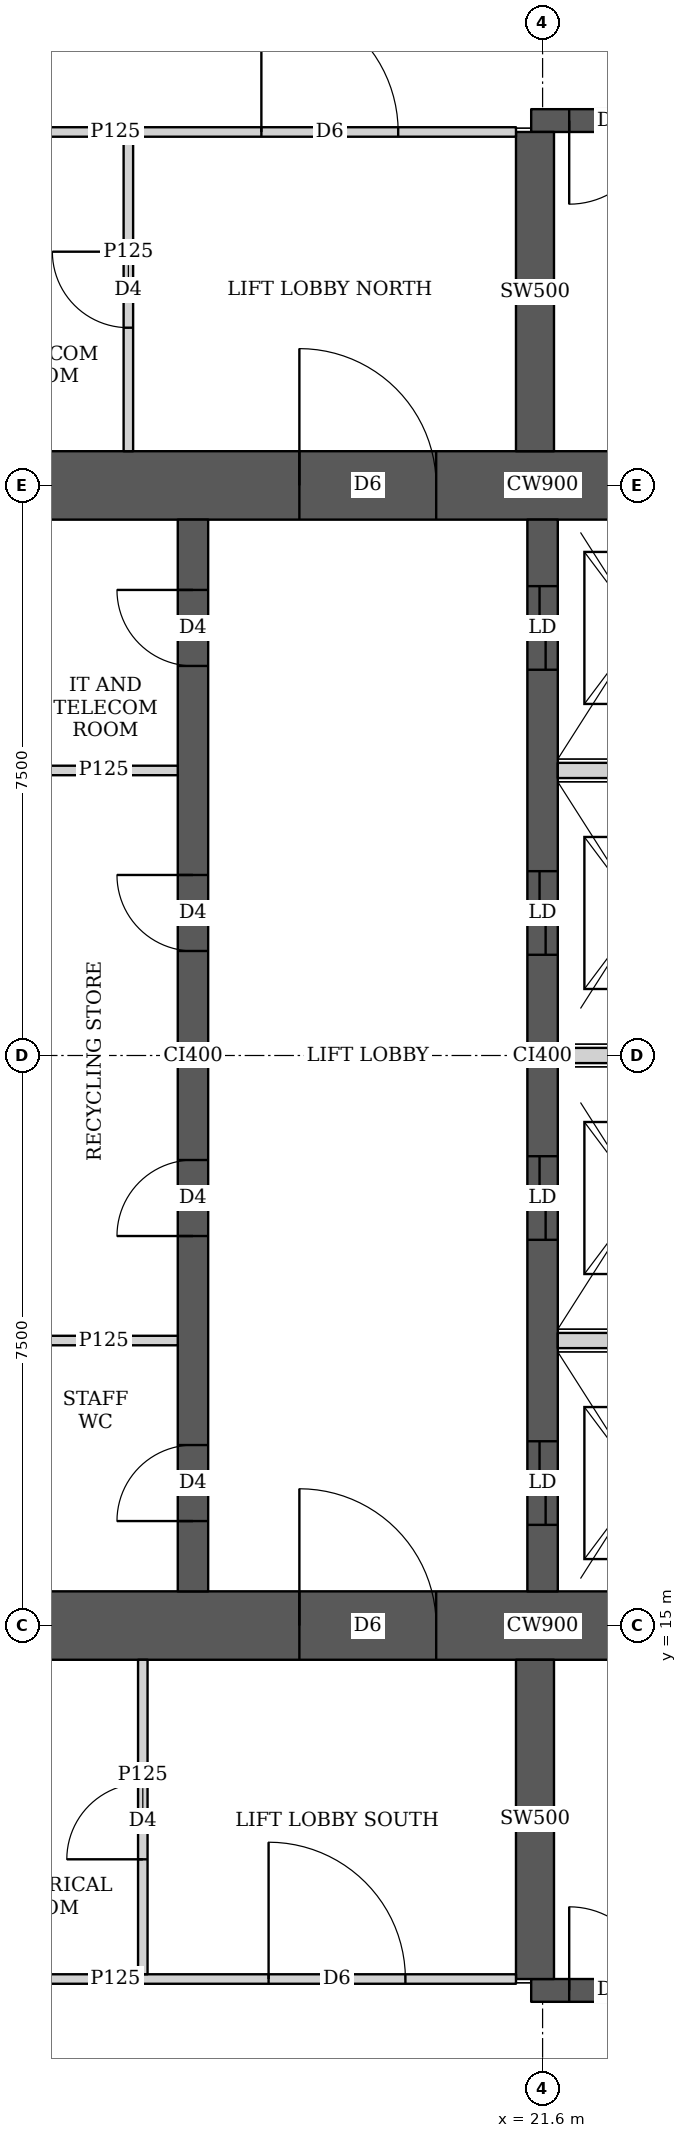
"""IFC4 building model, lengths in metres.
Left out: names, types, materials, properties, quantities, classifications, styles, units other than length and angle.
Written with IfcOpenShell. Run it as: python <this file> out.ifc"""

import sys

from ifc_helpers import new_model, si_unit, direction, frame, frame_2d, origin, place, context, subcontext, project, spatial, rectangle, extrude, element, fill, save


model = new_model("IFC4")
c1 = context("Model", 3, precision=1e-05, world=origin(), true_north=direction((0.0, 1.0)))
c2 = subcontext(c1, "Body", "Model", "MODEL_VIEW")
j1 = project(units=[si_unit("LENGTHUNIT", "METRE"), si_unit("PLANEANGLEUNIT", "RADIAN")], contexts=[c1])
p1 = place(None, origin())
s1 = spatial("IfcSite", under=j1, at=p1, CompositionType="ELEMENT")
p2 = place(p1, origin())
s2 = spatial("IfcBuilding", under=s1, at=p2, CompositionType="ELEMENT")
p3 = place(p2, frame((0.0, 0.0, 204.95)))
s3 = spatial("IfcBuildingStorey", under=s2, at=p3, CompositionType="ELEMENT", Elevation=204.95)
p4 = place(p3, frame((13.95, 15.0, 0.0), z_axis=(0.0, 0.0, 1.0), x_axis=(1.0, 0.0, 0.0)))
e1 = element("IfcWall", 1, at=p4, inside=s3, PredefinedType="SHEAR", context=c2, shape_type="SweptSolid", body=[
    extrude(rectangle(XDim=15.3, YDim=0.9, at=frame_2d((7.65, 0.0))), origin(), (0.0, 0.0, 1.0), 3.75),
])
p5 = place(p4, frame((4.45, 0.0, 0.0)))
e2 = element("IfcOpeningElement", 2, at=p5, cuts=e1, PredefinedType="OPENING", context=c2, shape_type="SweptSolid", body=[
    extrude(rectangle(XDim=1.8, YDim=2.1, at=frame_2d((0.9, 1.05))), frame((0.0, 0.46, 0.0), z_axis=(0.0, -1.0, 0.0), x_axis=(1.0, 0.0, 0.0)), (0.0, 0.0, 1.0), 0.92),
])
p6 = place(p4, frame((10.7, 0.0, 0.0)))
e3 = element("IfcOpeningElement", 3, at=p6, cuts=e1, PredefinedType="OPENING", context=c2, shape_type="SweptSolid", body=[
    extrude(rectangle(XDim=1.1, YDim=2.1, at=frame_2d((0.55, 1.05))), frame((0.0, 0.46, 0.0), z_axis=(0.0, -1.0, 0.0), x_axis=(1.0, 0.0, 0.0)), (0.0, 0.0, 1.0), 0.92),
])
p7 = place(p3, frame((13.95, 30.0, 0.0), z_axis=(0.0, 0.0, 1.0), x_axis=(1.0, 0.0, 0.0)))
e4 = element("IfcWall", 4, at=p7, inside=s3, PredefinedType="SHEAR", context=c2, shape_type="SweptSolid", body=[
    extrude(rectangle(XDim=15.3, YDim=0.9, at=frame_2d((7.65, 0.0))), origin(), (0.0, 0.0, 1.0), 3.75),
])
p8 = place(p7, frame((4.45, 0.0, 0.0)))
e5 = element("IfcOpeningElement", 5, at=p8, cuts=e4, PredefinedType="OPENING", context=c2, shape_type="SweptSolid", body=[
    extrude(rectangle(XDim=1.8, YDim=2.1, at=frame_2d((0.9, 1.05))), frame((0.0, 0.46, 0.0), z_axis=(0.0, -1.0, 0.0), x_axis=(1.0, 0.0, 0.0)), (0.0, 0.0, 1.0), 0.92),
])
p9 = place(p7, frame((10.7, 0.0, 0.0)))
e6 = element("IfcOpeningElement", 6, at=p9, cuts=e4, PredefinedType="OPENING", context=c2, shape_type="SweptSolid", body=[
    extrude(rectangle(XDim=1.1, YDim=2.1, at=frame_2d((0.55, 1.05))), frame((0.0, 0.46, 0.0), z_axis=(0.0, -1.0, 0.0), x_axis=(1.0, 0.0, 0.0)), (0.0, 0.0, 1.0), 0.92),
])
p10 = place(p3, frame((17.0, 15.45, 0.0), z_axis=(0.0, 0.0, 1.0), x_axis=(0.0, 1.0, 0.0)))
e7 = element("IfcWall", 7, at=p10, inside=s3, PredefinedType="SHEAR", context=c2, shape_type="SweptSolid", body=[
    extrude(rectangle(XDim=14.1, YDim=0.4, at=frame_2d((7.05, 0.0))), origin(), (0.0, 0.0, 1.0), 3.75),
])
p11 = place(p10, frame((0.925, 0.0, 0.0)))
e8 = element("IfcOpeningElement", 8, at=p11, cuts=e7, PredefinedType="OPENING", context=c2, shape_type="SweptSolid", body=[
    extrude(rectangle(XDim=1.0, YDim=2.1, at=frame_2d((0.5, 1.05))), frame((0.0, 0.21, 0.0), z_axis=(0.0, -1.0, 0.0), x_axis=(1.0, 0.0, 0.0)), (0.0, 0.0, 1.0), 0.42),
])
p12 = place(p10, frame((4.675, 0.0, 0.0)))
e9 = element("IfcOpeningElement", 9, at=p12, cuts=e7, PredefinedType="OPENING", context=c2, shape_type="SweptSolid", body=[
    extrude(rectangle(XDim=1.0, YDim=2.1, at=frame_2d((0.5, 1.05))), frame((0.0, 0.21, 0.0), z_axis=(0.0, -1.0, 0.0), x_axis=(1.0, 0.0, 0.0)), (0.0, 0.0, 1.0), 0.42),
])
p13 = place(p10, frame((8.425, 0.0, 0.0)))
e10 = element("IfcOpeningElement", 10, at=p13, cuts=e7, PredefinedType="OPENING", context=c2, shape_type="SweptSolid", body=[
    extrude(rectangle(XDim=1.0, YDim=2.1, at=frame_2d((0.5, 1.05))), frame((0.0, 0.21, 0.0), z_axis=(0.0, -1.0, 0.0), x_axis=(1.0, 0.0, 0.0)), (0.0, 0.0, 1.0), 0.42),
])
p14 = place(p10, frame((12.175, 0.0, 0.0)))
e11 = element("IfcOpeningElement", 11, at=p14, cuts=e7, PredefinedType="OPENING", context=c2, shape_type="SweptSolid", body=[
    extrude(rectangle(XDim=1.0, YDim=2.1, at=frame_2d((0.5, 1.05))), frame((0.0, 0.21, 0.0), z_axis=(0.0, -1.0, 0.0), x_axis=(1.0, 0.0, 0.0)), (0.0, 0.0, 1.0), 0.42),
])
p15 = place(p3, frame((21.6, 15.45, 0.0), z_axis=(0.0, 0.0, 1.0), x_axis=(0.0, 1.0, 0.0)))
e12 = element("IfcWall", 12, at=p15, inside=s3, PredefinedType="SHEAR", context=c2, shape_type="SweptSolid", body=[
    extrude(rectangle(XDim=14.1, YDim=0.4, at=frame_2d((7.05, 0.0))), origin(), (0.0, 0.0, 1.0), 3.75),
])
p16 = place(p15, frame((0.875, 0.0, 0.0)))
e13 = element("IfcOpeningElement", 13, at=p16, cuts=e12, PredefinedType="OPENING", context=c2, shape_type="SweptSolid", body=[
    extrude(rectangle(XDim=1.1, YDim=2.1, at=frame_2d((0.55, 1.05))), frame((0.0, 0.21, 0.0), z_axis=(0.0, -1.0, 0.0), x_axis=(1.0, 0.0, 0.0)), (0.0, 0.0, 1.0), 0.42),
])
p17 = place(p15, frame((4.625, 0.0, 0.0)))
e14 = element("IfcOpeningElement", 14, at=p17, cuts=e12, PredefinedType="OPENING", context=c2, shape_type="SweptSolid", body=[
    extrude(rectangle(XDim=1.1, YDim=2.1, at=frame_2d((0.55, 1.05))), frame((0.0, 0.21, 0.0), z_axis=(0.0, -1.0, 0.0), x_axis=(1.0, 0.0, 0.0)), (0.0, 0.0, 1.0), 0.42),
])
p18 = place(p15, frame((8.375, 0.0, 0.0)))
e15 = element("IfcOpeningElement", 15, at=p18, cuts=e12, PredefinedType="OPENING", context=c2, shape_type="SweptSolid", body=[
    extrude(rectangle(XDim=1.1, YDim=2.1, at=frame_2d((0.55, 1.05))), frame((0.0, 0.21, 0.0), z_axis=(0.0, -1.0, 0.0), x_axis=(1.0, 0.0, 0.0)), (0.0, 0.0, 1.0), 0.42),
])
p19 = place(p15, frame((12.125, 0.0, 0.0)))
e16 = element("IfcOpeningElement", 16, at=p19, cuts=e12, PredefinedType="OPENING", context=c2, shape_type="SweptSolid", body=[
    extrude(rectangle(XDim=1.1, YDim=2.1, at=frame_2d((0.55, 1.05))), frame((0.0, 0.21, 0.0), z_axis=(0.0, -1.0, 0.0), x_axis=(1.0, 0.0, 0.0)), (0.0, 0.0, 1.0), 0.42),
])
p20 = place(p3, frame((21.45, 10.2, 0.0), z_axis=(0.0, 0.0, 1.0), x_axis=(1.0, 0.0, 0.0)))
e17 = element("IfcWall", 17, at=p20, inside=s3, PredefinedType="SHEAR", context=c2, shape_type="SweptSolid", body=[
    extrude(rectangle(XDim=7.5, YDim=0.3, at=frame_2d((3.75, 0.0))), origin(), (0.0, 0.0, 1.0), 3.75),
])
p21 = place(p20, frame((0.5, 0.0, 0.0)))
e18 = element("IfcOpeningElement", 18, at=p21, cuts=e17, PredefinedType="OPENING", context=c2, shape_type="SweptSolid", body=[
    extrude(rectangle(XDim=1.1, YDim=2.1, at=frame_2d((0.55, 1.05))), frame((0.0, 0.16, 0.0), z_axis=(0.0, -1.0, 0.0), x_axis=(1.0, 0.0, 0.0)), (0.0, 0.0, 1.0), 0.32),
])
p22 = place(p3, frame((21.5, 10.35, 0.0), z_axis=(0.0, 0.0, 1.0), x_axis=(0.0, 1.0, 0.0)))
e19 = element("IfcWall", 19, at=p22, inside=s3, PredefinedType="SHEAR", context=c2, shape_type="SweptSolid", body=[
    extrude(rectangle(XDim=4.2, YDim=0.5, at=frame_2d((2.1, 0.0))), origin(), (0.0, 0.0, 1.0), 3.75),
])
p23 = place(p3, frame((21.45, 34.8, 0.0), z_axis=(0.0, 0.0, 1.0), x_axis=(1.0, 0.0, 0.0)))
e20 = element("IfcWall", 20, at=p23, inside=s3, PredefinedType="SHEAR", context=c2, shape_type="SweptSolid", body=[
    extrude(rectangle(XDim=7.5, YDim=0.3, at=frame_2d((3.75, 0.0))), origin(), (0.0, 0.0, 1.0), 3.75),
])
p24 = place(p23, frame((0.5, 0.0, 0.0)))
e21 = element("IfcOpeningElement", 21, at=p24, cuts=e20, PredefinedType="OPENING", context=c2, shape_type="SweptSolid", body=[
    extrude(rectangle(XDim=1.1, YDim=2.1, at=frame_2d((0.55, 1.05))), frame((0.0, 0.16, 0.0), z_axis=(0.0, -1.0, 0.0), x_axis=(1.0, 0.0, 0.0)), (0.0, 0.0, 1.0), 0.32),
])
p25 = place(p3, frame((21.5, 30.45, 0.0), z_axis=(0.0, 0.0, 1.0), x_axis=(0.0, 1.0, 0.0)))
e22 = element("IfcWall", 22, at=p25, inside=s3, PredefinedType="SHEAR", context=c2, shape_type="SweptSolid", body=[
    extrude(rectangle(XDim=4.2, YDim=0.5, at=frame_2d((2.1, 0.0))), origin(), (0.0, 0.0, 1.0), 3.75),
])
p26 = place(p3, frame((10.713, 10.35, 0.0), z_axis=(0.0, 0.0, 1.0), x_axis=(1.0, 0.0, 0.0)))
e23 = element("IfcWall", 23, at=p26, inside=s3, PredefinedType="PARTITIONING", context=c2, shape_type="SweptSolid", body=[
    extrude(rectangle(XDim=10.537, YDim=0.125, at=frame_2d((5.269, 0.0))), origin(), (0.0, 0.0, 1.0), 3.5),
])
p27 = place(p26, frame((7.282, 0.0, 0.0)))
e24 = element("IfcOpeningElement", 24, at=p27, cuts=e23, PredefinedType="OPENING", context=c2, shape_type="SweptSolid", body=[
    extrude(rectangle(XDim=1.8, YDim=2.1, at=frame_2d((0.9, 1.05))), frame((0.0, 0.073, 0.0), z_axis=(0.0, -1.0, 0.0), x_axis=(1.0, 0.0, 0.0)), (0.0, 0.0, 1.0), 0.145),
])
p28 = place(p3, frame((10.713, 34.65, 0.0), z_axis=(0.0, 0.0, 1.0), x_axis=(1.0, 0.0, 0.0)))
e25 = element("IfcWall", 25, at=p28, inside=s3, PredefinedType="PARTITIONING", context=c2, shape_type="SweptSolid", body=[
    extrude(rectangle(XDim=10.537, YDim=0.125, at=frame_2d((5.269, 0.0))), origin(), (0.0, 0.0, 1.0), 3.5),
])
p29 = place(p28, frame((7.187, 0.0, 0.0)))
e26 = element("IfcOpeningElement", 26, at=p29, cuts=e25, PredefinedType="OPENING", context=c2, shape_type="SweptSolid", body=[
    extrude(rectangle(XDim=1.8, YDim=2.1, at=frame_2d((0.9, 1.05))), frame((0.0, 0.073, 0.0), z_axis=(0.0, -1.0, 0.0), x_axis=(1.0, 0.0, 0.0)), (0.0, 0.0, 1.0), 0.145),
])
p30 = place(p3, frame((16.34, 10.413, 0.0), z_axis=(0.0, 0.0, 1.0), x_axis=(0.0, 1.0, 0.0)))
e27 = element("IfcWall", 27, at=p30, inside=s3, PredefinedType="PARTITIONING", context=c2, shape_type="SweptSolid", body=[
    extrude(rectangle(XDim=4.137, YDim=0.125, at=frame_2d((2.068, 0.0))), origin(), (0.0, 0.0, 1.0), 3.5),
])
p31 = place(p30, frame((1.512, 0.0, 0.0)))
e28 = element("IfcOpeningElement", 28, at=p31, cuts=e27, PredefinedType="OPENING", context=c2, shape_type="SweptSolid", body=[
    extrude(rectangle(XDim=1.0, YDim=2.1, at=frame_2d((0.5, 1.05))), frame((0.0, 0.073, 0.0), z_axis=(0.0, -1.0, 0.0), x_axis=(1.0, 0.0, 0.0)), (0.0, 0.0, 1.0), 0.145),
])
p32 = place(p3, frame((16.15, 30.45, 0.0), z_axis=(0.0, 0.0, 1.0), x_axis=(0.0, 1.0, 0.0)))
e29 = element("IfcWall", 29, at=p32, inside=s3, PredefinedType="PARTITIONING", context=c2, shape_type="SweptSolid", body=[
    extrude(rectangle(XDim=4.137, YDim=0.125, at=frame_2d((2.068, 0.0))), origin(), (0.0, 0.0, 1.0), 3.5),
])
p33 = place(p32, frame((1.625, 0.0, 0.0)))
e30 = element("IfcOpeningElement", 30, at=p33, cuts=e29, PredefinedType="OPENING", context=c2, shape_type="SweptSolid", body=[
    extrude(rectangle(XDim=1.0, YDim=2.1, at=frame_2d((0.5, 1.05))), frame((0.0, 0.073, 0.0), z_axis=(0.0, -1.0, 0.0), x_axis=(1.0, 0.0, 0.0)), (0.0, 0.0, 1.0), 0.145),
])
for number, where, z_axis, x_axis in (
    (31, (14.85, 18.75, 0.0), (0.0, 0.0, 1.0), (1.0, 0.0, 0.0)),
    (32, (14.85, 26.25, 0.0), (0.0, 0.0, 1.0), (1.0, 0.0, 0.0)),
):
    element("IfcWall", number, at=place(p3, frame(where, z_axis=z_axis, x_axis=x_axis)), inside=s3, PredefinedType="PARTITIONING", context=c2, shape_type="SweptSolid", body=[
        extrude(rectangle(XDim=1.95, YDim=0.125, at=frame_2d((0.975, 0.0))), origin(), (0.0, 0.0, 1.0), 3.5),
    ])
for number, where, z_axis, x_axis in (
    (33, (21.8, 18.75, 0.0), (0.0, 0.0, 1.0), (1.0, 0.0, 0.0)),
    (34, (21.8, 22.5, 0.0), (0.0, 0.0, 1.0), (1.0, 0.0, 0.0)),
    (35, (21.8, 26.25, 0.0), (0.0, 0.0, 1.0), (1.0, 0.0, 0.0)),
):
    element("IfcWall", number, at=place(p3, frame(where, z_axis=z_axis, x_axis=x_axis)), inside=s3, PredefinedType="SOLIDWALL", context=c2, shape_type="SweptSolid", body=[
        extrude(rectangle(XDim=2.2, YDim=0.2, at=frame_2d((1.1, 0.0))), origin(), (0.0, 0.0, 1.0), 3.5),
    ])
p34 = place(p31, origin())
e36 = element("IfcDoor", 36, at=p34, inside=s3, OperationType="SINGLE_SWING_LEFT", PredefinedType="DOOR", context=c2, shape_type="SweptSolid", body=[
    extrude(rectangle(XDim=1.0, YDim=2.1, at=frame_2d((0.5, 1.05))), frame((0.0, 0.025, 0.0), z_axis=(0.0, -1.0, 0.0), x_axis=(1.0, 0.0, 0.0)), (0.0, 0.0, 1.0), 0.05),
])
fill(e28, e36)
p35 = place(p27, origin())
e37 = element("IfcDoor", 37, at=p35, inside=s3, OperationType="DOUBLE_DOOR_SINGLE_SWING", PredefinedType="DOOR", context=c2, shape_type="SweptSolid", body=[
    extrude(rectangle(XDim=1.8, YDim=2.1, at=frame_2d((0.9, 1.05))), frame((0.0, 0.025, 0.0), z_axis=(0.0, -1.0, 0.0), x_axis=(1.0, 0.0, 0.0)), (0.0, 0.0, 1.0), 0.05),
])
fill(e24, e37)
p36 = place(p33, origin())
e38 = element("IfcDoor", 38, at=p36, inside=s3, OperationType="SINGLE_SWING_RIGHT", PredefinedType="DOOR", context=c2, shape_type="SweptSolid", body=[
    extrude(rectangle(XDim=1.0, YDim=2.1, at=frame_2d((0.5, 1.05))), frame((0.0, 0.025, 0.0), z_axis=(0.0, -1.0, 0.0), x_axis=(1.0, 0.0, 0.0)), (0.0, 0.0, 1.0), 0.05),
])
fill(e30, e38)
p37 = place(p29, origin())
e39 = element("IfcDoor", 39, at=p37, inside=s3, OperationType="DOUBLE_DOOR_SINGLE_SWING", PredefinedType="DOOR", context=c2, shape_type="SweptSolid", body=[
    extrude(rectangle(XDim=1.8, YDim=2.1, at=frame_2d((0.9, 1.05))), frame((0.0, 0.025, 0.0), z_axis=(0.0, -1.0, 0.0), x_axis=(1.0, 0.0, 0.0)), (0.0, 0.0, 1.0), 0.05),
])
fill(e26, e39)
p38 = place(p11, origin())
e40 = element("IfcDoor", 40, at=p38, inside=s3, OperationType="SINGLE_SWING_LEFT", PredefinedType="DOOR", context=c2, shape_type="SweptSolid", body=[
    extrude(rectangle(XDim=1.0, YDim=2.1, at=frame_2d((0.5, 1.05))), frame((0.0, 0.025, 0.0), z_axis=(0.0, -1.0, 0.0), x_axis=(1.0, 0.0, 0.0)), (0.0, 0.0, 1.0), 0.05),
])
fill(e8, e40)
p39 = place(p12, origin())
e41 = element("IfcDoor", 41, at=p39, inside=s3, OperationType="SINGLE_SWING_LEFT", PredefinedType="DOOR", context=c2, shape_type="SweptSolid", body=[
    extrude(rectangle(XDim=1.0, YDim=2.1, at=frame_2d((0.5, 1.05))), frame((0.0, 0.025, 0.0), z_axis=(0.0, -1.0, 0.0), x_axis=(1.0, 0.0, 0.0)), (0.0, 0.0, 1.0), 0.05),
])
fill(e9, e41)
p40 = place(p13, origin())
e42 = element("IfcDoor", 42, at=p40, inside=s3, OperationType="SINGLE_SWING_RIGHT", PredefinedType="DOOR", context=c2, shape_type="SweptSolid", body=[
    extrude(rectangle(XDim=1.0, YDim=2.1, at=frame_2d((0.5, 1.05))), frame((0.0, 0.025, 0.0), z_axis=(0.0, -1.0, 0.0), x_axis=(1.0, 0.0, 0.0)), (0.0, 0.0, 1.0), 0.05),
])
fill(e10, e42)
p41 = place(p14, origin())
e43 = element("IfcDoor", 43, at=p41, inside=s3, OperationType="SINGLE_SWING_RIGHT", PredefinedType="DOOR", context=c2, shape_type="SweptSolid", body=[
    extrude(rectangle(XDim=1.0, YDim=2.1, at=frame_2d((0.5, 1.05))), frame((0.0, 0.025, 0.0), z_axis=(0.0, -1.0, 0.0), x_axis=(1.0, 0.0, 0.0)), (0.0, 0.0, 1.0), 0.05),
])
fill(e11, e43)
p42 = place(p5, origin())
e44 = element("IfcDoor", 44, at=p42, inside=s3, OperationType="DOUBLE_DOOR_SINGLE_SWING", PredefinedType="DOOR", context=c2, shape_type="SweptSolid", body=[
    extrude(rectangle(XDim=1.8, YDim=2.1, at=frame_2d((0.9, 1.05))), frame((0.0, 0.025, 0.0), z_axis=(0.0, -1.0, 0.0), x_axis=(1.0, 0.0, 0.0)), (0.0, 0.0, 1.0), 0.05),
])
fill(e2, e44)
p43 = place(p8, origin())
e45 = element("IfcDoor", 45, at=p43, inside=s3, OperationType="DOUBLE_DOOR_SINGLE_SWING", PredefinedType="DOOR", context=c2, shape_type="SweptSolid", body=[
    extrude(rectangle(XDim=1.8, YDim=2.1, at=frame_2d((0.9, 1.05))), frame((0.0, 0.025, 0.0), z_axis=(0.0, -1.0, 0.0), x_axis=(1.0, 0.0, 0.0)), (0.0, 0.0, 1.0), 0.05),
])
fill(e5, e45)
p44 = place(p16, origin())
e46 = element("IfcDoor", 46, at=p44, inside=s3, OperationType="DOUBLE_DOOR_SLIDING", PredefinedType="DOOR", context=c2, shape_type="SweptSolid", body=[
    extrude(rectangle(XDim=1.1, YDim=2.1, at=frame_2d((0.55, 1.05))), frame((0.0, 0.025, 0.0), z_axis=(0.0, -1.0, 0.0), x_axis=(1.0, 0.0, 0.0)), (0.0, 0.0, 1.0), 0.05),
])
fill(e13, e46)
p45 = place(p17, origin())
e47 = element("IfcDoor", 47, at=p45, inside=s3, OperationType="DOUBLE_DOOR_SLIDING", PredefinedType="DOOR", context=c2, shape_type="SweptSolid", body=[
    extrude(rectangle(XDim=1.1, YDim=2.1, at=frame_2d((0.55, 1.05))), frame((0.0, 0.025, 0.0), z_axis=(0.0, -1.0, 0.0), x_axis=(1.0, 0.0, 0.0)), (0.0, 0.0, 1.0), 0.05),
])
fill(e14, e47)
p46 = place(p18, origin())
e48 = element("IfcDoor", 48, at=p46, inside=s3, OperationType="DOUBLE_DOOR_SLIDING", PredefinedType="DOOR", context=c2, shape_type="SweptSolid", body=[
    extrude(rectangle(XDim=1.1, YDim=2.1, at=frame_2d((0.55, 1.05))), frame((0.0, 0.025, 0.0), z_axis=(0.0, -1.0, 0.0), x_axis=(1.0, 0.0, 0.0)), (0.0, 0.0, 1.0), 0.05),
])
fill(e15, e48)
p47 = place(p19, origin())
e49 = element("IfcDoor", 49, at=p47, inside=s3, OperationType="DOUBLE_DOOR_SLIDING", PredefinedType="DOOR", context=c2, shape_type="SweptSolid", body=[
    extrude(rectangle(XDim=1.1, YDim=2.1, at=frame_2d((0.55, 1.05))), frame((0.0, 0.025, 0.0), z_axis=(0.0, -1.0, 0.0), x_axis=(1.0, 0.0, 0.0)), (0.0, 0.0, 1.0), 0.05),
])
fill(e16, e49)
p48 = place(p21, origin())
e50 = element("IfcDoor", 50, at=p48, inside=s3, OperationType="SINGLE_SWING_LEFT", PredefinedType="DOOR", context=c2, shape_type="SweptSolid", body=[
    extrude(rectangle(XDim=1.1, YDim=2.1, at=frame_2d((0.55, 1.05))), frame((0.0, 0.025, 0.0), z_axis=(0.0, -1.0, 0.0), x_axis=(1.0, 0.0, 0.0)), (0.0, 0.0, 1.0), 0.05),
])
fill(e18, e50)
p49 = place(p24, origin())
e51 = element("IfcDoor", 51, at=p49, inside=s3, OperationType="SINGLE_SWING_RIGHT", PredefinedType="DOOR", context=c2, shape_type="SweptSolid", body=[
    extrude(rectangle(XDim=1.1, YDim=2.1, at=frame_2d((0.55, 1.05))), frame((0.0, 0.025, 0.0), z_axis=(0.0, -1.0, 0.0), x_axis=(1.0, 0.0, 0.0)), (0.0, 0.0, 1.0), 0.05),
])
fill(e21, e51)
save(model, sys.argv[1])
